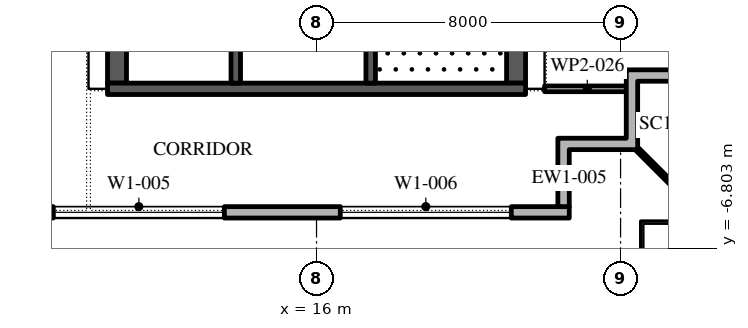
"""IFC4 building model, lengths in metres.
Left out: names, types, materials, properties, quantities, classifications, styles, units other than length and angle.
Written with IfcOpenShell. Run it as: python <this file> out.ifc"""

import sys

from ifc_helpers import new_model, si_unit, direction, frame, frame_2d, origin, place, context, subcontext, project, spatial, polyline, rectangle, outline, extrude, element, fill, save


model = new_model("IFC4")
c1 = context("Model", 3, precision=1e-05, world=origin(), true_north=direction((0.0, 1.0)))
c2 = subcontext(c1, "Body", "Model", "MODEL_VIEW")
j1 = project(units=[si_unit("LENGTHUNIT", "METRE"), si_unit("PLANEANGLEUNIT", "RADIAN")], contexts=[c1])
p1 = place(None, origin())
s1 = spatial("IfcSite", under=j1, at=p1, CompositionType="ELEMENT")
p2 = place(p1, origin())
s2 = spatial("IfcBuilding", under=s1, at=p2, CompositionType="ELEMENT")
p3 = place(p2, frame((0.0, 0.0, 313.2)))
s3 = spatial("IfcBuildingStorey", under=s2, at=p3, CompositionType="ELEMENT", Elevation=313.2)
p4 = place(p3, frame((-22.35, -5.85, 0.0), z_axis=(0.0, 0.0, 1.0), x_axis=(1.0, 0.0, 0.0)))
e1 = element("IfcWall", 1, at=p4, inside=s3, PredefinedType="STANDARD", context=c2, shape_type="SweptSolid", body=[
    extrude(rectangle(XDim=45.0, YDim=0.3, at=frame_2d((22.5, 0.0))), origin(), (0.0, 0.0, 1.0), 4.0),
])
p5 = place(p4, frame((1.375, 0.0, 0.45)))
e2 = element("IfcOpeningElement", 2, at=p5, cuts=e1, PredefinedType="OPENING", context=c2, shape_type="SweptSolid", body=[
    extrude(rectangle(XDim=4.5, YDim=3.05, at=frame_2d((2.25, 1.525))), frame((0.0, 0.16, 0.0), z_axis=(0.0, -1.0, 0.0), x_axis=(1.0, 0.0, 0.0)), (0.0, 0.0, 1.0), 0.32),
])
p6 = place(p4, frame((8.775, 0.0, 0.45)))
e3 = element("IfcOpeningElement", 3, at=p6, cuts=e1, PredefinedType="OPENING", context=c2, shape_type="SweptSolid", body=[
    extrude(rectangle(XDim=4.5, YDim=3.05, at=frame_2d((2.25, 1.525))), frame((0.0, 0.16, 0.0), z_axis=(0.0, -1.0, 0.0), x_axis=(1.0, 0.0, 0.0)), (0.0, 0.0, 1.0), 0.32),
])
p7 = place(p4, frame((17.375, 0.0, 0.0)))
e4 = element("IfcOpeningElement", 4, at=p7, cuts=e1, PredefinedType="OPENING", context=c2, shape_type="SweptSolid", body=[
    extrude(rectangle(XDim=2.4, YDim=3.5, at=frame_2d((1.2, 1.75))), frame((0.0, 0.16, 0.0), z_axis=(0.0, -1.0, 0.0), x_axis=(1.0, 0.0, 0.0)), (0.0, 0.0, 1.0), 0.32),
])
p8 = place(p4, frame((23.875, 0.0, 0.45)))
e5 = element("IfcOpeningElement", 5, at=p8, cuts=e1, PredefinedType="OPENING", context=c2, shape_type="SweptSolid", body=[
    extrude(rectangle(XDim=4.5, YDim=3.05, at=frame_2d((2.25, 1.525))), frame((0.0, 0.16, 0.0), z_axis=(0.0, -1.0, 0.0), x_axis=(1.0, 0.0, 0.0)), (0.0, 0.0, 1.0), 0.32),
])
p9 = place(p4, frame((31.425, 0.0, 0.45)))
e6 = element("IfcOpeningElement", 6, at=p9, cuts=e1, PredefinedType="OPENING", context=c2, shape_type="SweptSolid", body=[
    extrude(rectangle(XDim=4.5, YDim=3.05, at=frame_2d((2.25, 1.525))), frame((0.0, 0.16, 0.0), z_axis=(0.0, -1.0, 0.0), x_axis=(1.0, 0.0, 0.0)), (0.0, 0.0, 1.0), 0.32),
])
p10 = place(p4, frame((38.975, 0.0, 0.45)))
e7 = element("IfcOpeningElement", 7, at=p10, cuts=e1, PredefinedType="OPENING", context=c2, shape_type="SweptSolid", body=[
    extrude(rectangle(XDim=4.5, YDim=3.05, at=frame_2d((2.25, 1.525))), frame((0.0, 0.16, 0.0), z_axis=(0.0, -1.0, 0.0), x_axis=(1.0, 0.0, 0.0)), (0.0, 0.0, 1.0), 0.32),
])
p11 = place(p3, origin())
e8 = element("IfcWall", 8, at=p11, inside=s3, PredefinedType="STANDARD", context=c2, shape_type="SweptSolid", body=[
    extrude(outline(polyline([(24.15, -3.9), (24.15, -2.1), (26.25, -2.1), (26.25, -2.4), (24.45, -2.4), (24.45, -4.2), (22.65, -4.2), (22.65, -5.7), (22.35, -5.7), (22.35, -3.9), (24.15, -3.9)])), origin(), (0.0, 0.0, 1.0), 4.0),
])
p12 = place(p3, frame((24.45, -4.2, -0.05), z_axis=(0.0, 0.0, 1.0), x_axis=(0.707106781187, -0.707106781187, 0.0)))
e9 = element("IfcWall", 9, at=p12, inside=s3, PredefinedType="STANDARD", context=c2, shape_type="SweptSolid", body=[
    extrude(rectangle(XDim=2.667, YDim=0.1, at=frame_2d((1.333, 0.0))), origin(), (0.0, 0.0, 1.0), 4.05),
])
p13 = place(p3, frame((21.25, -2.45, 0.0), z_axis=(0.0, 0.0, 1.0), x_axis=(0.0, 1.0, 0.0)))
e10 = element("IfcWall", 10, at=p13, inside=s3, PredefinedType="SHEAR", context=c2, shape_type="SweptSolid", body=[
    extrude(rectangle(XDim=27.9, YDim=0.5, at=frame_2d((13.95, 0.0))), origin(), (0.0, 0.0, 1.0), 4.0),
])
p14 = place(p13, frame((5.05, 0.0, 0.0)))
e11 = element("IfcOpeningElement", 11, at=p14, cuts=e10, PredefinedType="OPENING", context=c2, shape_type="SweptSolid", body=[
    extrude(rectangle(XDim=1.2, YDim=2.1, at=frame_2d((0.6, 1.05))), frame((0.0, 0.26, 0.0), z_axis=(0.0, -1.0, 0.0), x_axis=(1.0, 0.0, 0.0)), (0.0, 0.0, 1.0), 0.52),
])
p15 = place(p13, frame((21.65, 0.0, 0.0)))
e12 = element("IfcOpeningElement", 12, at=p15, cuts=e10, PredefinedType="OPENING", context=c2, shape_type="SweptSolid", body=[
    extrude(rectangle(XDim=1.2, YDim=2.1, at=frame_2d((0.6, 1.05))), frame((0.0, 0.26, 0.0), z_axis=(0.0, -1.0, 0.0), x_axis=(1.0, 0.0, 0.0)), (0.0, 0.0, 1.0), 0.52),
])
p16 = place(p3, frame((10.75, -2.45, 0.0), z_axis=(0.0, 0.0, 1.0), x_axis=(0.0, 1.0, 0.0)))
e13 = element("IfcWall", 13, at=p16, inside=s3, PredefinedType="SHEAR", context=c2, shape_type="SweptSolid", body=[
    extrude(rectangle(XDim=27.9, YDim=0.5, at=frame_2d((13.95, 0.0))), origin(), (0.0, 0.0, 1.0), 4.0),
])
p17 = place(p16, frame((23.65, 0.0, 0.0)))
e14 = element("IfcOpeningElement", 14, at=p17, cuts=e13, PredefinedType="OPENING", context=c2, shape_type="SweptSolid", body=[
    extrude(rectangle(XDim=2.4, YDim=2.1, at=frame_2d((1.2, 1.05))), frame((0.0, 0.26, 0.0), z_axis=(0.0, -1.0, 0.0), x_axis=(1.0, 0.0, 0.0)), (0.0, 0.0, 1.0), 0.52),
])
p18 = place(p16, frame((1.387, 0.0, 0.0)))
e15 = element("IfcOpeningElement", 15, at=p18, cuts=e13, PredefinedType="OPENING", context=c2, shape_type="SweptSolid", body=[
    extrude(rectangle(XDim=0.9, YDim=2.1, at=frame_2d((0.45, 1.05))), frame((0.0, 0.26, 0.0), z_axis=(0.0, -1.0, 0.0), x_axis=(1.0, 0.0, 0.0)), (0.0, 0.0, 1.0), 0.52),
])
p19 = place(p16, frame((4.562, 0.0, 0.0)))
e16 = element("IfcOpeningElement", 16, at=p19, cuts=e13, PredefinedType="OPENING", context=c2, shape_type="SweptSolid", body=[
    extrude(rectangle(XDim=1.0, YDim=2.1, at=frame_2d((0.5, 1.05))), frame((0.0, 0.26, 0.0), z_axis=(0.0, -1.0, 0.0), x_axis=(1.0, 0.0, 0.0)), (0.0, 0.0, 1.0), 0.52),
])
p20 = place(p3, frame((10.5, -2.6, 0.0), z_axis=(0.0, 0.0, 1.0), x_axis=(1.0, 0.0, 0.0)))
e17 = element("IfcWall", 17, at=p20, inside=s3, PredefinedType="SHEAR", context=c2, shape_type="SweptSolid", body=[
    extrude(rectangle(XDim=11.0, YDim=0.3, at=frame_2d((5.5, 0.0))), origin(), (0.0, 0.0, 1.0), 4.0),
])
p21 = place(p3, frame((17.425, -2.45, 0.0), z_axis=(0.0, 0.0, 1.0), x_axis=(0.0, 1.0, 0.0)))
e18 = element("IfcWall", 18, at=p21, inside=s3, PredefinedType="SHEAR", context=c2, shape_type="SweptSolid", body=[
    extrude(rectangle(XDim=6.3, YDim=0.25, at=frame_2d((3.15, 0.0))), origin(), (0.0, 0.0, 1.0), 4.0),
])
p22 = place(p21, frame((5.05, 0.0, 0.0)))
e19 = element("IfcOpeningElement", 19, at=p22, cuts=e18, PredefinedType="OPENING", context=c2, shape_type="SweptSolid", body=[
    extrude(rectangle(XDim=1.2, YDim=2.1, at=frame_2d((0.6, 1.05))), frame((0.0, 0.135, 0.0), z_axis=(0.0, -1.0, 0.0), x_axis=(1.0, 0.0, 0.0)), (0.0, 0.0, 1.0), 0.27),
])
p23 = place(p3, frame((13.875, -2.45, 0.0), z_axis=(0.0, 0.0, 1.0), x_axis=(0.0, 1.0, 0.0)))
e20 = element("IfcWall", 20, at=p23, inside=s3, PredefinedType="SHEAR", context=c2, shape_type="SweptSolid", body=[
    extrude(rectangle(XDim=21.3, YDim=0.25, at=frame_2d((10.65, 0.0))), origin(), (0.0, 0.0, 1.0), 4.0),
])
p24 = place(p23, frame((9.846, 0.0, 0.0)))
e21 = element("IfcOpeningElement", 21, at=p24, cuts=e20, PredefinedType="OPENING", context=c2, shape_type="SweptSolid", body=[
    extrude(rectangle(XDim=0.9, YDim=2.1, at=frame_2d((0.45, 1.05))), frame((0.0, 0.135, 0.0), z_axis=(0.0, -1.0, 0.0), x_axis=(1.0, 0.0, 0.0)), (0.0, 0.0, 1.0), 0.27),
])
p25 = place(p23, frame((12.911, 0.0, 0.0)))
e22 = element("IfcOpeningElement", 22, at=p25, cuts=e20, PredefinedType="OPENING", context=c2, shape_type="SweptSolid", body=[
    extrude(rectangle(XDim=0.9, YDim=2.1, at=frame_2d((0.45, 1.05))), frame((0.0, 0.135, 0.0), z_axis=(0.0, -1.0, 0.0), x_axis=(1.0, 0.0, 0.0)), (0.0, 0.0, 1.0), 0.27),
])
p26 = place(p23, frame((6.971, 0.0, 0.0)))
e23 = element("IfcOpeningElement", 23, at=p26, cuts=e20, PredefinedType="OPENING", context=c2, shape_type="SweptSolid", body=[
    extrude(rectangle(XDim=1.1, YDim=2.1, at=frame_2d((0.55, 1.05))), frame((0.0, 0.135, 0.0), z_axis=(0.0, -1.0, 0.0), x_axis=(1.0, 0.0, 0.0)), (0.0, 0.0, 1.0), 0.27),
])
p27 = place(p23, frame((15.543, 0.0, 0.0)))
e24 = element("IfcOpeningElement", 24, at=p27, cuts=e20, PredefinedType="OPENING", context=c2, shape_type="SweptSolid", body=[
    extrude(rectangle(XDim=1.1, YDim=2.1, at=frame_2d((0.55, 1.05))), frame((0.0, 0.135, 0.0), z_axis=(0.0, -1.0, 0.0), x_axis=(1.0, 0.0, 0.0)), (0.0, 0.0, 1.0), 0.27),
])
p28 = place(p23, frame((17.686, 0.0, 0.0)))
e25 = element("IfcOpeningElement", 25, at=p28, cuts=e20, PredefinedType="OPENING", context=c2, shape_type="SweptSolid", body=[
    extrude(rectangle(XDim=1.1, YDim=2.1, at=frame_2d((0.55, 1.05))), frame((0.0, 0.135, 0.0), z_axis=(0.0, -1.0, 0.0), x_axis=(1.0, 0.0, 0.0)), (0.0, 0.0, 1.0), 0.27),
])
p29 = place(p23, frame((19.829, 0.0, 0.0)))
e26 = element("IfcOpeningElement", 26, at=p29, cuts=e20, PredefinedType="OPENING", context=c2, shape_type="SweptSolid", body=[
    extrude(rectangle(XDim=1.1, YDim=2.1, at=frame_2d((0.55, 1.05))), frame((0.0, 0.135, 0.0), z_axis=(0.0, -1.0, 0.0), x_axis=(1.0, 0.0, 0.0)), (0.0, 0.0, 1.0), 0.27),
])
p30 = place(p3, frame((22.0, -2.6, 0.0), z_axis=(0.0, 0.0, 1.0), x_axis=(1.0, 0.0, 0.0)))
e27 = element("IfcWall", 27, at=p30, inside=s3, PredefinedType="PARTITIONING", context=c2, shape_type="SweptSolid", body=[
    extrude(rectangle(XDim=2.25, YDim=0.15, at=frame_2d((1.125, 0.0))), origin(), (0.0, 0.0, 1.0), 4.0),
])
p31 = place(p9, origin())
e28 = element("IfcWindow", 28, at=p31, inside=s3, PartitioningType="DOUBLE_PANEL_VERTICAL", PredefinedType="WINDOW", context=c2, shape_type="SweptSolid", body=[
    extrude(rectangle(XDim=4.5, YDim=3.05, at=frame_2d((2.25, 1.525))), frame((0.0, 0.03, 0.0), z_axis=(0.0, -1.0, 0.0), x_axis=(1.0, 0.0, 0.0)), (0.0, 0.0, 1.0), 0.06),
])
fill(e6, e28)
p32 = place(p10, origin())
e29 = element("IfcWindow", 29, at=p32, inside=s3, PartitioningType="DOUBLE_PANEL_VERTICAL", PredefinedType="WINDOW", context=c2, shape_type="SweptSolid", body=[
    extrude(rectangle(XDim=4.5, YDim=3.05, at=frame_2d((2.25, 1.525))), frame((0.0, 0.03, 0.0), z_axis=(0.0, -1.0, 0.0), x_axis=(1.0, 0.0, 0.0)), (0.0, 0.0, 1.0), 0.06),
])
fill(e7, e29)
save(model, sys.argv[1])
